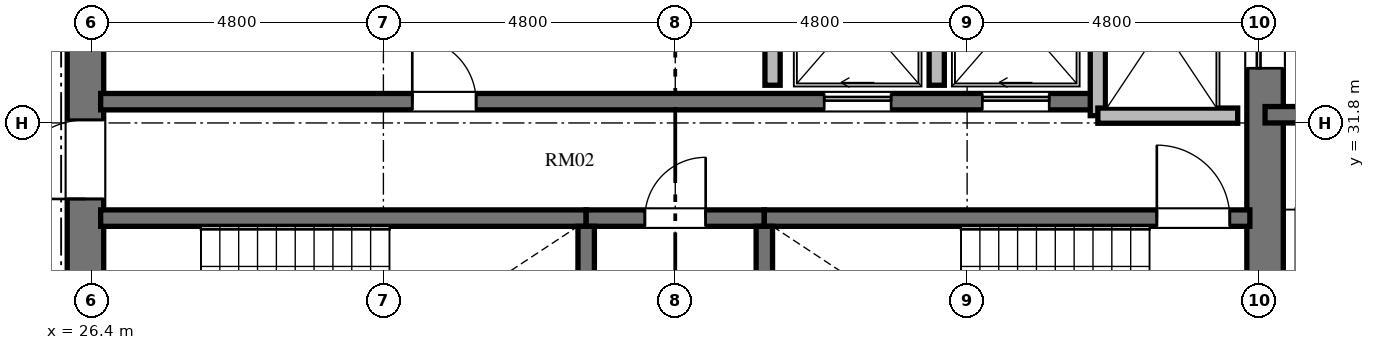
"""IFC4 building model, lengths in metres.
Left out: names, types, materials, properties, quantities, classifications, styles, units other than length and angle.
Written with IfcOpenShell. Run it as: python <this file> out.ifc"""

import sys

from ifc_helpers import new_model, si_unit, direction, frame, frame_2d, origin, place, context, subcontext, project, spatial, rectangle, extrude, element, fill, save


model = new_model("IFC4")
c1 = context("Model", 3, precision=1e-05, world=origin(), true_north=direction((0.0, 1.0)))
c2 = subcontext(c1, "Body", "Model", "MODEL_VIEW")
j1 = project(units=[si_unit("LENGTHUNIT", "METRE"), si_unit("PLANEANGLEUNIT", "RADIAN")], contexts=[c1])
p1 = place(None, origin())
s1 = spatial("IfcSite", under=j1, at=p1, CompositionType="ELEMENT")
p2 = place(p1, origin())
s2 = spatial("IfcBuilding", under=s1, at=p2, CompositionType="ELEMENT")
p3 = place(p2, frame((0.0, 0.0, 194.832)))
s3 = spatial("IfcBuildingStorey", under=s2, at=p3, CompositionType="ELEMENT", Elevation=194.832)
p4 = place(p3, frame((26.3, 20.95, 0.0), z_axis=(0.0, 0.0, 1.0), x_axis=(0.0, 1.0, 0.0)))
e1 = element("IfcWall", 1, at=p4, inside=s3, PredefinedType="SHEAR", context=c2, shape_type="SweptSolid", body=[
    extrude(rectangle(XDim=14.1, YDim=0.6, at=frame_2d((7.05, 0.0))), origin(), (0.0, 0.0, 1.0), 3.648),
])
p5 = place(p4, frame((6.5, 0.0, 0.0)))
e2 = element("IfcOpeningElement", 2, at=p5, cuts=e1, PredefinedType="OPENING", context=c2, shape_type="SweptSolid", body=[
    extrude(rectangle(XDim=1.2, YDim=2.15, at=frame_2d((0.6, 1.075))), frame((0.0, 0.31, 0.0), z_axis=(0.0, -1.0, 0.0), x_axis=(1.0, 0.0, 0.0)), (0.0, 0.0, 1.0), 0.62),
])
p6 = place(p4, frame((9.6, 0.0, 0.0)))
e3 = element("IfcOpeningElement", 3, at=p6, cuts=e1, PredefinedType="OPENING", context=c2, shape_type="SweptSolid", body=[
    extrude(rectangle(XDim=1.3, YDim=2.2, at=frame_2d((0.65, 1.1))), frame((0.0, 0.31, 0.0), z_axis=(0.0, -1.0, 0.0), x_axis=(1.0, 0.0, 0.0)), (0.0, 0.0, 1.0), 0.62),
])
p7 = place(p4, frame((3.26, 0.0, 0.0)))
e4 = element("IfcOpeningElement", 4, at=p7, cuts=e1, PredefinedType="OPENING", context=c2, shape_type="SweptSolid", body=[
    extrude(rectangle(XDim=1.3, YDim=2.2, at=frame_2d((0.65, 1.1))), frame((0.0, 0.31, 0.0), z_axis=(0.0, -1.0, 0.0), x_axis=(1.0, 0.0, 0.0)), (0.0, 0.0, 1.0), 0.62),
])
p8 = place(p3, frame((45.7, 20.95, 0.0), z_axis=(0.0, 0.0, 1.0), x_axis=(0.0, 1.0, 0.0)))
e5 = element("IfcWall", 5, at=p8, inside=s3, PredefinedType="SHEAR", context=c2, shape_type="SweptSolid", body=[
    extrude(rectangle(XDim=14.1, YDim=0.6, at=frame_2d((7.05, 0.0))), origin(), (0.0, 0.0, 1.0), 3.648),
])
p9 = place(p8, frame((11.75, 0.0, 0.0)))
e6 = element("IfcOpeningElement", 6, at=p9, cuts=e5, PredefinedType="OPENING", context=c2, shape_type="SweptSolid", body=[
    extrude(rectangle(XDim=1.4, YDim=2.3, at=frame_2d((0.7, 1.15))), frame((0.0, 0.31, 0.0), z_axis=(0.0, -1.0, 0.0), x_axis=(1.0, 0.0, 0.0)), (0.0, 0.0, 1.0), 0.62),
])
p10 = place(p8, frame((0.95, 0.0, 0.0)))
e7 = element("IfcOpeningElement", 7, at=p10, cuts=e5, PredefinedType="OPENING", context=c2, shape_type="SweptSolid", body=[
    extrude(rectangle(XDim=1.4, YDim=2.3, at=frame_2d((0.7, 1.15))), frame((0.0, 0.31, 0.0), z_axis=(0.0, -1.0, 0.0), x_axis=(1.0, 0.0, 0.0)), (0.0, 0.0, 1.0), 0.62),
])
p11 = place(p3, frame((26.55, 30.235, 0.0), z_axis=(0.0, 0.0, 1.0), x_axis=(1.0, 0.0, 0.0)))
e8 = element("IfcWall", 8, at=p11, inside=s3, PredefinedType="SHEAR", context=c2, shape_type="SweptSolid", body=[
    extrude(rectangle(XDim=7.985, YDim=0.27, at=frame_2d((3.992, 0.0))), origin(), (0.0, 0.0, 1.0), 3.648),
])
p12 = place(p3, frame((34.535, 30.235, 0.0), z_axis=(0.0, 0.0, 1.0), x_axis=(1.0, 0.0, 0.0)))
e9 = element("IfcWall", 9, at=p12, inside=s3, PredefinedType="SHEAR", context=c2, shape_type="SweptSolid", body=[
    extrude(rectangle(XDim=2.93, YDim=0.27, at=frame_2d((1.465, 0.0))), origin(), (0.0, 0.0, 1.0), 3.648),
])
p13 = place(p12, frame((0.965, 0.0, 0.0)))
e10 = element("IfcOpeningElement", 10, at=p13, cuts=e9, PredefinedType="OPENING", context=c2, shape_type="SweptSolid", body=[
    extrude(rectangle(XDim=1.0, YDim=2.1, at=frame_2d((0.5, 1.05))), frame((0.0, 0.145, 0.0), z_axis=(0.0, -1.0, 0.0), x_axis=(1.0, 0.0, 0.0)), (0.0, 0.0, 1.0), 0.29),
])
p14 = place(p3, frame((37.465, 30.235, 0.0), z_axis=(0.0, 0.0, 1.0), x_axis=(1.0, 0.0, 0.0)))
e11 = element("IfcWall", 11, at=p14, inside=s3, PredefinedType="SHEAR", context=c2, shape_type="SweptSolid", body=[
    extrude(rectangle(XDim=7.985, YDim=0.27, at=frame_2d((3.992, 0.0))), origin(), (0.0, 0.0, 1.0), 3.648),
])
p15 = place(p14, frame((6.455, 0.0, 0.0)))
e12 = element("IfcOpeningElement", 12, at=p15, cuts=e11, PredefinedType="OPENING", context=c2, shape_type="SweptSolid", body=[
    extrude(rectangle(XDim=1.2, YDim=2.15, at=frame_2d((0.6, 1.075))), frame((0.0, 0.145, 0.0), z_axis=(0.0, -1.0, 0.0), x_axis=(1.0, 0.0, 0.0)), (0.0, 0.0, 1.0), 0.29),
])
for number, where, z_axis, x_axis in (
    (13, (34.535, 26.02, 0.0), (0.0, 0.0, 1.0), (0.0, 1.0, 0.0)),
    (14, (37.465, 26.02, 0.0), (0.0, 0.0, 1.0), (0.0, 1.0, 0.0)),
):
    element("IfcWall", number, at=place(p3, frame(where, z_axis=z_axis, x_axis=x_axis)), inside=s3, PredefinedType="SHEAR", context=c2, shape_type="SweptSolid", body=[
        extrude(rectangle(XDim=4.08, YDim=0.27, at=frame_2d((2.04, 0.0))), origin(), (0.0, 0.0, 1.0), 3.648),
    ])
p16 = place(p3, frame((26.55, 32.15, 0.0), z_axis=(0.0, 0.0, 1.0), x_axis=(1.0, 0.0, 0.0)))
e15 = element("IfcWall", 15, at=p16, inside=s3, PredefinedType="SHEAR", context=c2, shape_type="SweptSolid", body=[
    extrude(rectangle(XDim=16.4, YDim=0.27, at=frame_2d((8.2, 0.0))), origin(), (0.0, 0.0, 1.0), 3.648),
])
p17 = place(p16, frame((5.125, 0.0, 0.0)))
e16 = element("IfcOpeningElement", 16, at=p17, cuts=e15, PredefinedType="OPENING", context=c2, shape_type="SweptSolid", body=[
    extrude(rectangle(XDim=1.05, YDim=2.15, at=frame_2d((0.525, 1.075))), frame((0.0, 0.145, 0.0), z_axis=(0.0, -1.0, 0.0), x_axis=(1.0, 0.0, 0.0)), (0.0, 0.0, 1.0), 0.29),
])
p18 = place(p16, frame((11.9, 0.0, 0.0)))
e17 = element("IfcOpeningElement", 17, at=p18, cuts=e15, PredefinedType="OPENING", context=c2, shape_type="SweptSolid", body=[
    extrude(rectangle(XDim=1.1, YDim=2.2, at=frame_2d((0.55, 1.1))), frame((0.0, 0.145, 0.0), z_axis=(0.0, -1.0, 0.0), x_axis=(1.0, 0.0, 0.0)), (0.0, 0.0, 1.0), 0.29),
])
p19 = place(p16, frame((14.5, 0.0, 0.0)))
e18 = element("IfcOpeningElement", 18, at=p19, cuts=e15, PredefinedType="OPENING", context=c2, shape_type="SweptSolid", body=[
    extrude(rectangle(XDim=1.1, YDim=2.2, at=frame_2d((0.55, 1.1))), frame((0.0, 0.145, 0.0), z_axis=(0.0, -1.0, 0.0), x_axis=(1.0, 0.0, 0.0)), (0.0, 0.0, 1.0), 0.29),
])
p20 = place(p3, frame((42.95, 31.92, 0.0), z_axis=(0.0, 0.0, 1.0), x_axis=(0.0, 1.0, 0.0)))
e19 = element("IfcWall", 19, at=p20, inside=s3, PredefinedType="SOLIDWALL", context=c2, shape_type="SweptSolid", body=[
    extrude(rectangle(XDim=3.18, YDim=0.25, at=frame_2d((1.59, 0.0))), origin(), (0.0, 0.0, 1.0), 3.448),
])
p21 = place(p3, frame((42.95, 31.92, 0.0), z_axis=(0.0, 0.0, 1.0), x_axis=(1.0, 0.0, 0.0)))
e20 = element("IfcWall", 20, at=p21, inside=s3, PredefinedType="SOLIDWALL", context=c2, shape_type="SweptSolid", body=[
    extrude(rectangle(XDim=2.3, YDim=0.25, at=frame_2d((1.15, 0.0))), origin(), (0.0, 0.0, 1.0), 3.448),
])
for number, where, z_axis, x_axis in (
    (21, (37.6, 32.42, 0.0), (0.0, 0.0, 1.0), (0.0, 1.0, 0.0)),
    (22, (40.3, 32.42, 0.0), (0.0, 0.0, 1.0), (0.0, 1.0, 0.0)),
):
    element("IfcWall", number, at=place(p3, frame(where, z_axis=z_axis, x_axis=x_axis)), inside=s3, PredefinedType="SOLIDWALL", context=c2, shape_type="SweptSolid", body=[
        extrude(rectangle(XDim=2.68, YDim=0.25, at=frame_2d((1.34, 0.0))), origin(), (0.0, 0.0, 1.0), 3.448),
    ])
p22 = place(p3, frame((45.7, 31.935, 0.0), z_axis=(0.0, 0.0, 1.0), x_axis=(1.0, 0.0, 0.0)))
e23 = element("IfcWall", 23, at=p22, inside=s3, PredefinedType="SHEAR", context=c2, shape_type="SweptSolid", body=[
    extrude(rectangle(XDim=4.715, YDim=0.27, at=frame_2d((2.357, 0.0))), origin(), (0.0, 0.0, 1.0), 3.648),
])
p23 = place(p15, origin())
e24 = element("IfcDoor", 24, at=p23, inside=s3, OperationType="SINGLE_SWING_LEFT", PredefinedType="DOOR", context=c2, shape_type="SweptSolid", body=[
    extrude(rectangle(XDim=1.2, YDim=2.15, at=frame_2d((0.6, 1.075))), frame((0.0, 0.025, 0.0), z_axis=(0.0, -1.0, 0.0), x_axis=(1.0, 0.0, 0.0)), (0.0, 0.0, 1.0), 0.05),
])
fill(e12, e24)
p24 = place(p13, origin())
e25 = element("IfcDoor", 25, at=p24, inside=s3, OperationType="SINGLE_SWING_RIGHT", PredefinedType="DOOR", context=c2, shape_type="SweptSolid", body=[
    extrude(rectangle(XDim=1.0, YDim=2.1, at=frame_2d((0.5, 1.05))), frame((0.0, 0.025, 0.0), z_axis=(0.0, -1.0, 0.0), x_axis=(1.0, 0.0, 0.0)), (0.0, 0.0, 1.0), 0.05),
])
fill(e10, e25)
p25 = place(p6, origin())
e26 = element("IfcDoor", 26, at=p25, inside=s3, OperationType="SINGLE_SWING_LEFT", PredefinedType="DOOR", context=c2, shape_type="SweptSolid", body=[
    extrude(rectangle(XDim=1.3, YDim=2.2, at=frame_2d((0.65, 1.1))), frame((0.0, 0.025, 0.0), z_axis=(0.0, -1.0, 0.0), x_axis=(1.0, 0.0, 0.0)), (0.0, 0.0, 1.0), 0.05),
])
fill(e3, e26)
p26 = place(p17, origin())
e27 = element("IfcDoor", 27, at=p26, inside=s3, OperationType="SINGLE_SWING_LEFT", PredefinedType="DOOR", context=c2, shape_type="SweptSolid", body=[
    extrude(rectangle(XDim=1.05, YDim=2.15, at=frame_2d((0.525, 1.075))), frame((0.0, 0.025, 0.0), z_axis=(0.0, -1.0, 0.0), x_axis=(1.0, 0.0, 0.0)), (0.0, 0.0, 1.0), 0.05),
])
fill(e16, e27)
p27 = place(p18, origin())
e28 = element("IfcDoor", 28, at=p27, inside=s3, OperationType="SLIDING_TO_LEFT", PredefinedType="DOOR", context=c2, shape_type="SweptSolid", body=[
    extrude(rectangle(XDim=1.1, YDim=2.2, at=frame_2d((0.55, 1.1))), frame((0.0, 0.025, 0.0), z_axis=(0.0, -1.0, 0.0), x_axis=(1.0, 0.0, 0.0)), (0.0, 0.0, 1.0), 0.05),
])
fill(e17, e28)
p28 = place(p19, origin())
e29 = element("IfcDoor", 29, at=p28, inside=s3, OperationType="SLIDING_TO_LEFT", PredefinedType="DOOR", context=c2, shape_type="SweptSolid", body=[
    extrude(rectangle(XDim=1.1, YDim=2.2, at=frame_2d((0.55, 1.1))), frame((0.0, 0.025, 0.0), z_axis=(0.0, -1.0, 0.0), x_axis=(1.0, 0.0, 0.0)), (0.0, 0.0, 1.0), 0.05),
])
fill(e18, e29)
p29 = place(p9, origin())
e30 = element("IfcDoor", 30, at=p29, inside=s3, OperationType="SLIDING_TO_LEFT", PredefinedType="DOOR", context=c2, shape_type="SweptSolid", body=[
    extrude(rectangle(XDim=1.4, YDim=2.3, at=frame_2d((0.7, 1.15))), frame((0.0, 0.025, 0.0), z_axis=(0.0, -1.0, 0.0), x_axis=(1.0, 0.0, 0.0)), (0.0, 0.0, 1.0), 0.05),
])
fill(e6, e30)
save(model, sys.argv[1])
